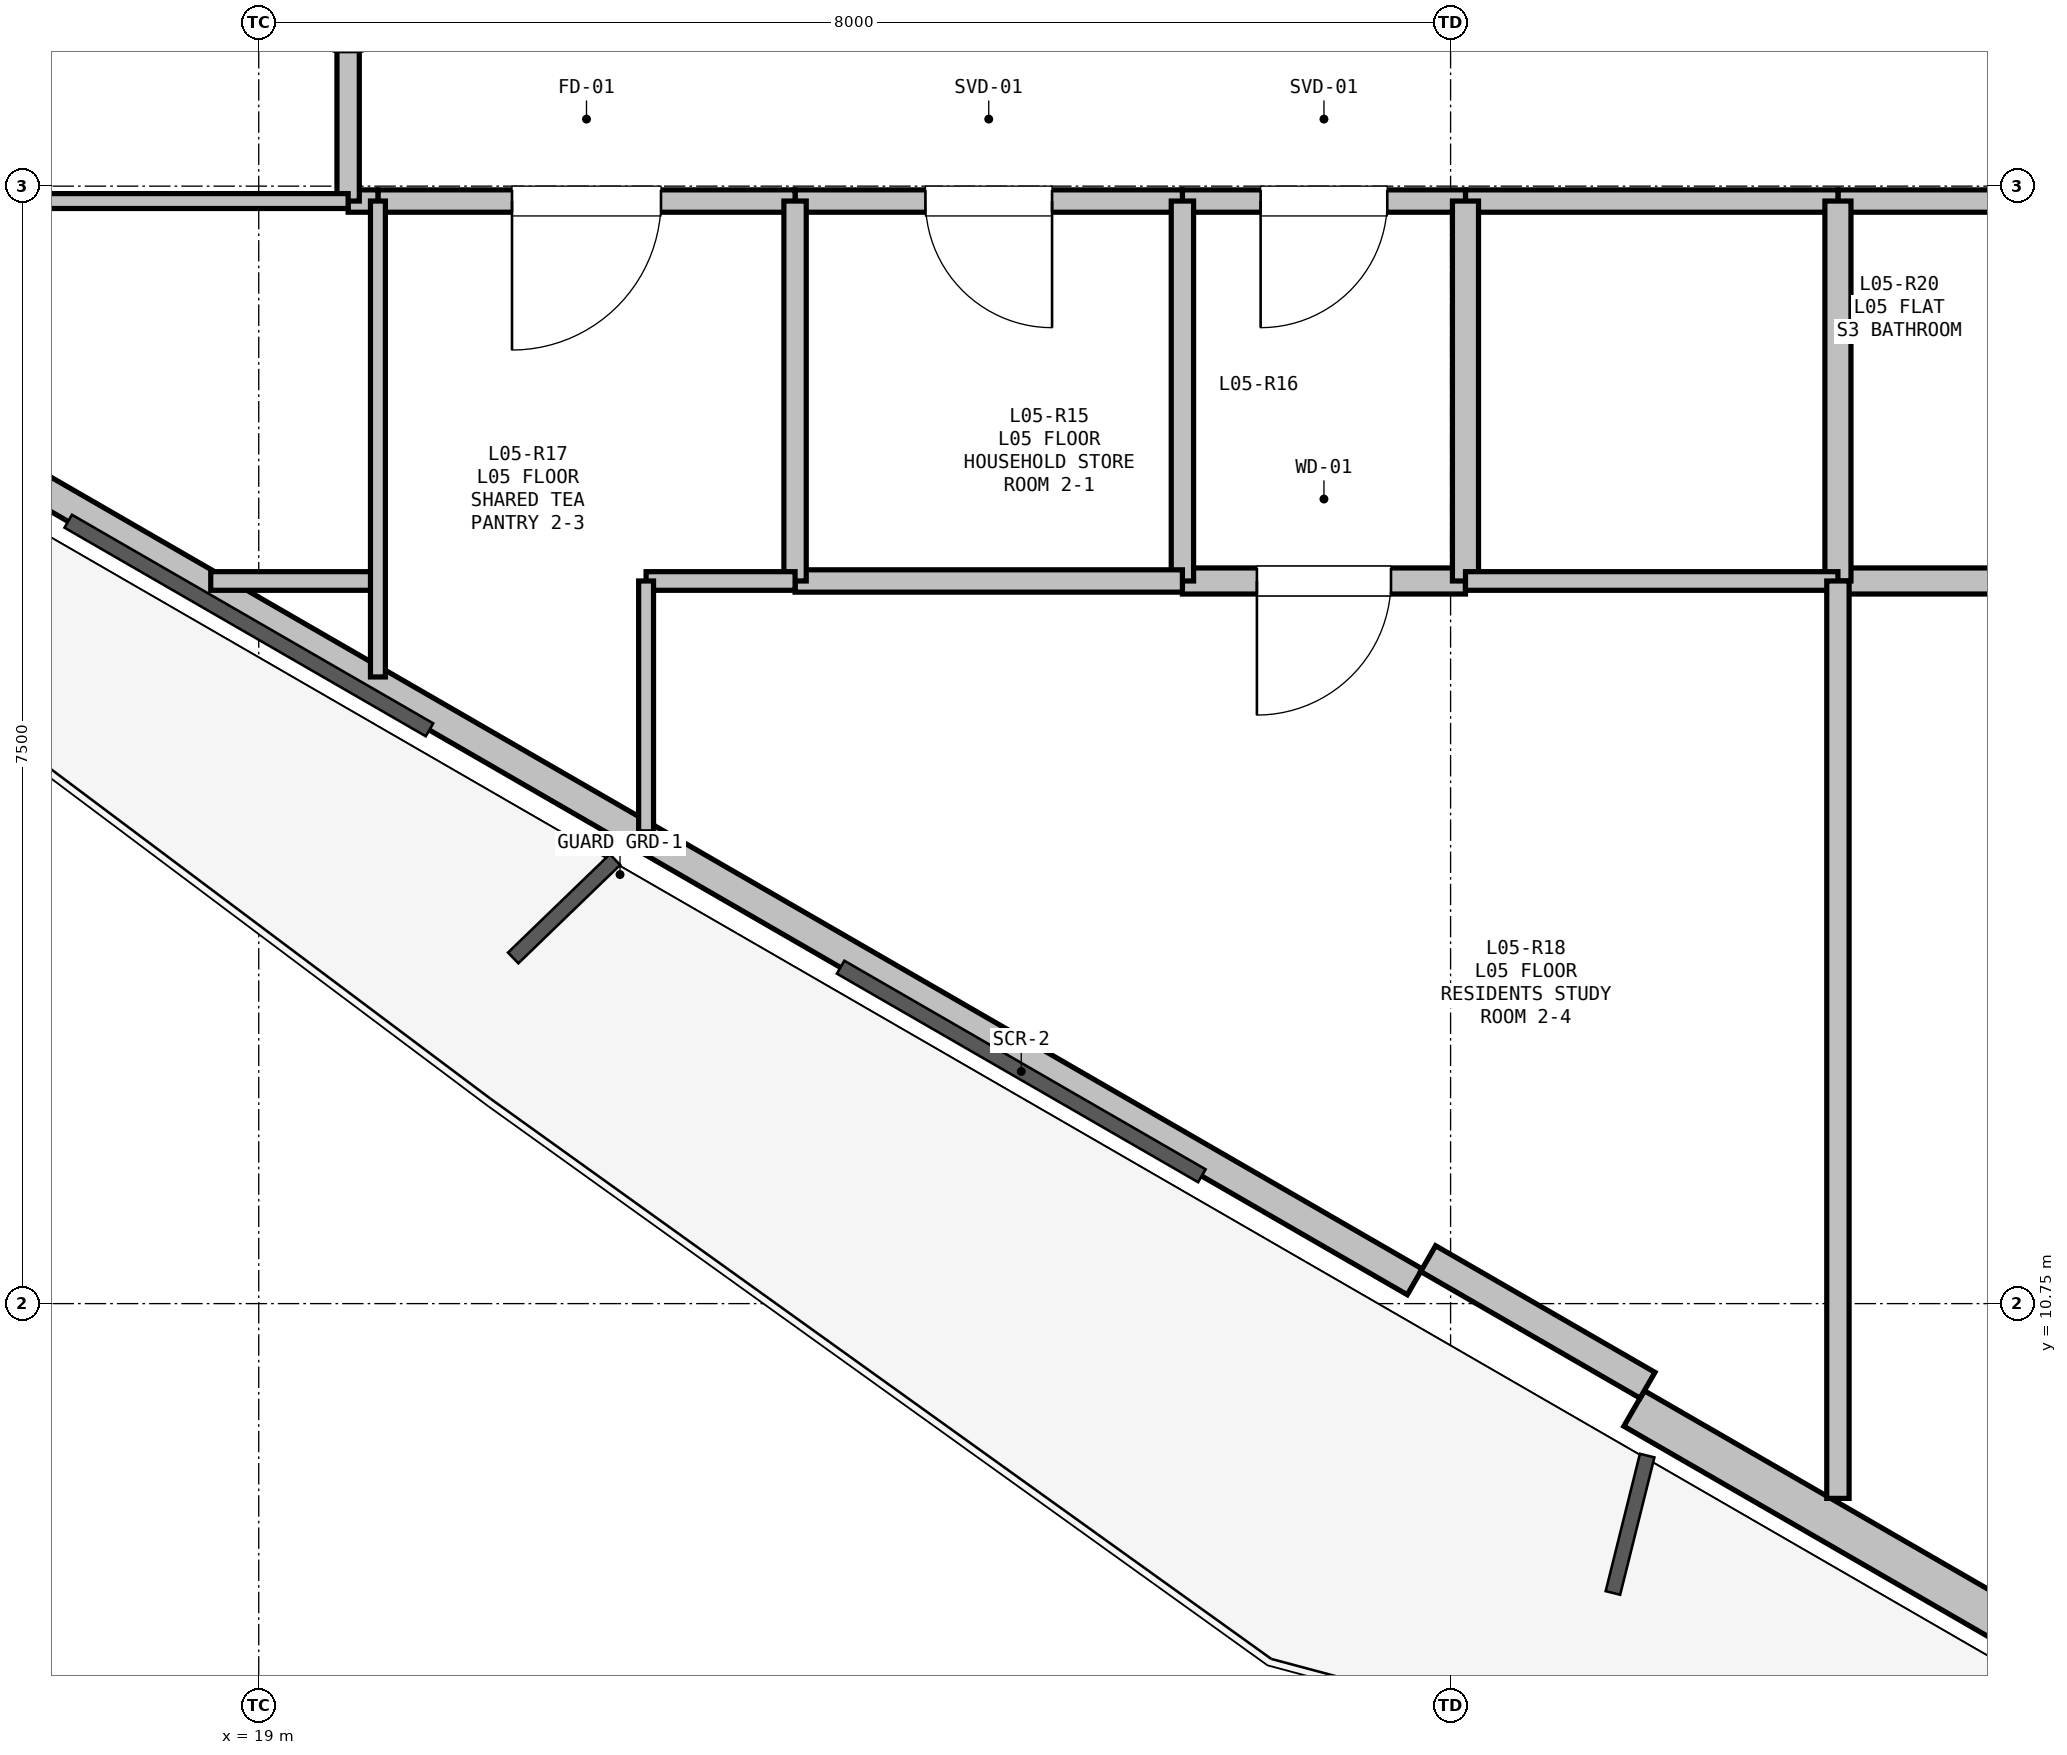
"""IFC4 building model, lengths in metres.
Left out: names, types, materials, properties, quantities, classifications, styles, units other than length and angle.
Written with IfcOpenShell. Run it as: python <this file> out.ifc"""

import sys

from ifc_helpers import new_model, si_unit, direction, frame, frame_2d, origin, place, context, subcontext, project, spatial, rectangle, extrude, element, fill, save


model = new_model("IFC4")
c1 = context("Model", 3, precision=1e-05, world=origin(), true_north=direction((0.0, 1.0)))
c2 = subcontext(c1, "Body", "Model", "MODEL_VIEW")
j1 = project(units=[si_unit("LENGTHUNIT", "METRE"), si_unit("PLANEANGLEUNIT", "RADIAN")], contexts=[c1])
p1 = place(None, origin())
s1 = spatial("IfcSite", under=j1, at=p1, CompositionType="ELEMENT")
p2 = place(p1, origin())
s2 = spatial("IfcBuilding", under=s1, at=p2, CompositionType="ELEMENT")
p3 = place(p2, frame((0.0, 0.0, 22.5)))
s3 = spatial("IfcBuildingStorey", under=s2, at=p3, CompositionType="ELEMENT", Elevation=22.5)
p4 = place(p3, frame((39.207, 3.71, 0.0), z_axis=(0.0, 0.0, 1.0), x_axis=(-0.86603192154, 0.499988710747, 0.0)))
e1 = element("IfcWall", 1, at=p4, inside=s3, PredefinedType="SOLIDWALL", context=c2, shape_type="SweptSolid", body=[
    extrude(rectangle(XDim=12.673, YDim=0.275, at=frame_2d((6.336, 0.0))), origin(), (0.0, 0.0, 1.0), 2.66),
])
p5 = place(p4, frame((8.136, 0.0, 0.0)))
e2 = element("IfcOpeningElement", 2, at=p5, cuts=e1, PredefinedType="OPENING", context=c2, shape_type="SweptSolid", body=[
    extrude(rectangle(XDim=1.0, YDim=2.1, at=frame_2d((0.5, 1.05))), frame((0.0, 0.147, 0.0), z_axis=(0.0, -1.0, 0.0), x_axis=(1.0, 0.0, 0.0)), (0.0, 0.0, 1.0), 0.295),
])
p6 = place(p4, frame((2.216, 0.0, 0.9)))
e3 = element("IfcOpeningElement", 3, at=p6, cuts=e1, PredefinedType="OPENING", context=c2, shape_type="SweptSolid", body=[
    extrude(rectangle(XDim=1.2, YDim=1.4, at=frame_2d((0.6, 0.7))), frame((0.0, 0.147, 0.0), z_axis=(0.0, -1.0, 0.0), x_axis=(1.0, 0.0, 0.0)), (0.0, 0.0, 1.0), 0.295),
])
p7 = place(p3, frame((26.76, 10.896, 0.0), z_axis=(0.0, 0.0, 1.0), x_axis=(-0.866027351828, 0.499996625875, 0.0)))
e4 = element("IfcWall", 4, at=p7, inside=s3, PredefinedType="PARAPET", context=c2, shape_type="SweptSolid", body=[
    extrude(rectangle(XDim=11.973, YDim=0.2, at=frame_2d((5.987, 0.0))), origin(), (0.0, 0.0, 1.0), 0.2),
])
p8 = place(p3, frame((28.322, 10.202, 0.0), z_axis=(0.0, 0.0, 1.0), x_axis=(-0.86605165483, 0.499954529098, 0.0)))
e5 = element("IfcWall", 5, at=p8, inside=s3, PredefinedType="PARAPET", context=c2, shape_type="SweptSolid", body=[
    extrude(rectangle(XDim=1.7, YDim=0.2, at=frame_2d((0.85, 0.0))), origin(), (0.0, 0.0, 1.0), 2.66),
])
p9 = place(p3, frame((31.6, 18.15, 0.0), z_axis=(0.0, 0.0, 1.0), x_axis=(-1.0, 0.0, 0.0)))
e6 = element("IfcWall", 6, at=p9, inside=s3, PredefinedType="PARTITIONING", context=c2, shape_type="SweptSolid", body=[
    extrude(rectangle(XDim=2.0, YDim=0.15, at=frame_2d((1.0, 0.0))), origin(), (0.0, 0.0, 1.0), 3.04),
])
p10 = place(p3, frame((29.6, 18.15, 0.0), z_axis=(0.0, 0.0, 1.0), x_axis=(-1.0, 0.0, 0.0)))
e7 = element("IfcWall", 7, at=p10, inside=s3, PredefinedType="PARTITIONING", context=c2, shape_type="SweptSolid", body=[
    extrude(rectangle(XDim=2.5, YDim=0.15, at=frame_2d((1.25, 0.0))), origin(), (0.0, 0.0, 1.0), 3.04),
])
p11 = place(p3, frame((27.1, 18.15, 0.0), z_axis=(0.0, 0.0, 1.0), x_axis=(-1.0, 0.0, 0.0)))
e8 = element("IfcWall", 8, at=p11, inside=s3, PredefinedType="PARTITIONING", context=c2, shape_type="SweptSolid", body=[
    extrude(rectangle(XDim=1.9, YDim=0.15, at=frame_2d((0.95, 0.0))), origin(), (0.0, 0.0, 1.0), 3.04),
])
p12 = place(p11, frame((0.525, 0.0, 0.0)))
e9 = element("IfcOpeningElement", 9, at=p12, cuts=e8, PredefinedType="OPENING", context=c2, shape_type="SweptSolid", body=[
    extrude(rectangle(XDim=0.85, YDim=2.1, at=frame_2d((0.425, 1.05))), frame((0.0, 0.085, 0.0), z_axis=(0.0, -1.0, 0.0), x_axis=(1.0, 0.0, 0.0)), (0.0, 0.0, 1.0), 0.17),
])
p13 = place(p3, frame((25.2, 18.15, 0.0), z_axis=(0.0, 0.0, 1.0), x_axis=(-1.0, 0.0, 0.0)))
e10 = element("IfcWall", 10, at=p13, inside=s3, PredefinedType="PARTITIONING", context=c2, shape_type="SweptSolid", body=[
    extrude(rectangle(XDim=2.6, YDim=0.15, at=frame_2d((1.3, 0.0))), origin(), (0.0, 0.0, 1.0), 2.337),
])
p14 = place(p13, frame((0.875, 0.0, 0.0)))
e11 = element("IfcOpeningElement", 11, at=p14, cuts=e10, PredefinedType="OPENING", context=c2, shape_type="SweptSolid", body=[
    extrude(rectangle(XDim=0.85, YDim=2.1, at=frame_2d((0.425, 1.05))), frame((0.0, 0.085, 0.0), z_axis=(0.0, -1.0, 0.0), x_axis=(1.0, 0.0, 0.0)), (0.0, 0.0, 1.0), 0.17),
])
p15 = place(p3, frame((22.6, 18.15, 0.0), z_axis=(0.0, 0.0, 1.0), x_axis=(-1.0, 0.0, 0.0)))
e12 = element("IfcWall", 12, at=p15, inside=s3, PredefinedType="PARTITIONING", context=c2, shape_type="SweptSolid", body=[
    extrude(rectangle(XDim=2.8, YDim=0.15, at=frame_2d((1.4, 0.0))), origin(), (0.0, 0.0, 1.0), 3.04),
])
p16 = place(p15, frame((0.9, 0.0, 0.0)))
e13 = element("IfcOpeningElement", 13, at=p16, cuts=e12, PredefinedType="OPENING", context=c2, shape_type="SweptSolid", body=[
    extrude(rectangle(XDim=1.0, YDim=2.15, at=frame_2d((0.5, 1.075))), frame((0.0, 0.085, 0.0), z_axis=(0.0, -1.0, 0.0), x_axis=(1.0, 0.0, 0.0)), (0.0, 0.0, 1.0), 0.17),
])
p17 = place(p3, frame((19.8, 18.15, 0.0), z_axis=(0.0, 0.0, 1.0), x_axis=(-1.0, 0.0, 0.0)))
e14 = element("IfcWall", 14, at=p17, inside=s3, PredefinedType="PARTITIONING", context=c2, shape_type="SweptSolid", body=[
    extrude(rectangle(XDim=0.2, YDim=0.15, at=frame_2d((0.1, 0.0))), origin(), (0.0, 0.0, 1.0), 3.04),
])
p18 = place(p3, frame((19.6, 18.15, 0.0), z_axis=(0.0, 0.0, 1.0), x_axis=(0.0, 1.0, 0.0)))
e15 = element("IfcWall", 15, at=p18, inside=s3, PredefinedType="PARTITIONING", context=c2, shape_type="SweptSolid", body=[
    extrude(rectangle(XDim=3.0, YDim=0.15, at=frame_2d((1.5, 0.0))), origin(), (0.0, 0.0, 1.0), 2.337),
])
p19 = place(p18, frame((1.0, 0.0, 0.0)))
e16 = element("IfcOpeningElement", 16, at=p19, cuts=e15, PredefinedType="OPENING", context=c2, shape_type="SweptSolid", body=[
    extrude(rectangle(XDim=1.0, YDim=2.15, at=frame_2d((0.5, 1.075))), frame((0.0, 0.085, 0.0), z_axis=(0.0, -1.0, 0.0), x_axis=(1.0, 0.0, 0.0)), (0.0, 0.0, 1.0), 0.17),
])
p20 = place(p3, frame((27.1, 15.6, 0.0), z_axis=(0.0, 0.0, 1.0), x_axis=(-1.0, 0.0, 0.0)))
e17 = element("IfcWall", 17, at=p20, inside=s3, PredefinedType="PLUMBINGWALL", context=c2, shape_type="SweptSolid", body=[
    extrude(rectangle(XDim=1.9, YDim=0.175, at=frame_2d((0.95, 0.0))), origin(), (0.0, 0.0, 1.0), 2.337),
])
p21 = place(p20, frame((0.5, 0.0, 0.0)))
e18 = element("IfcOpeningElement", 18, at=p21, cuts=e17, PredefinedType="OPENING", context=c2, shape_type="SweptSolid", body=[
    extrude(rectangle(XDim=0.9, YDim=2.1, at=frame_2d((0.45, 1.05))), frame((0.0, 0.097, 0.0), z_axis=(0.0, -1.0, 0.0), x_axis=(1.0, 0.0, 0.0)), (0.0, 0.0, 1.0), 0.195),
])
p22 = place(p3, frame((25.2, 15.6, 0.0), z_axis=(0.0, 0.0, 1.0), x_axis=(0.0, 1.0, 0.0)))
e19 = element("IfcWall", 19, at=p22, inside=s3, PredefinedType="PARTITIONING", context=c2, shape_type="SweptSolid", body=[
    extrude(rectangle(XDim=2.55, YDim=0.15, at=frame_2d((1.275, 0.0))), origin(), (0.0, 0.0, 1.0), 2.337),
])
p23 = place(p3, frame((27.1, 18.15, 0.0), z_axis=(0.0, 0.0, 1.0), x_axis=(0.0, -1.0, 0.0)))
e20 = element("IfcWall", 20, at=p23, inside=s3, PredefinedType="PLUMBINGWALL", context=c2, shape_type="SweptSolid", body=[
    extrude(rectangle(XDim=2.55, YDim=0.175, at=frame_2d((1.275, 0.0))), origin(), (0.0, 0.0, 1.0), 3.04),
])
p24 = place(p3, frame((31.6, 15.6, 0.0), z_axis=(0.0, 0.0, 1.0), x_axis=(-1.0, 0.0, 0.0)))
e21 = element("IfcWall", 21, at=p24, inside=s3, PredefinedType="PLUMBINGWALL", context=c2, shape_type="SweptSolid", body=[
    extrude(rectangle(XDim=2.0, YDim=0.175, at=frame_2d((1.0, 0.0))), origin(), (0.0, 0.0, 1.0), 3.04),
])
p25 = place(p3, frame((29.6, 15.6, 0.0), z_axis=(0.0, 0.0, 1.0), x_axis=(0.0, 1.0, 0.0)))
e22 = element("IfcWall", 22, at=p25, inside=s3, PredefinedType="PLUMBINGWALL", context=c2, shape_type="SweptSolid", body=[
    extrude(rectangle(XDim=2.55, YDim=0.175, at=frame_2d((1.275, 0.0))), origin(), (0.0, 0.0, 1.0), 3.04),
])
p26 = place(p3, frame((19.6, 18.15, 0.0), z_axis=(0.0, 0.0, 1.0), x_axis=(-1.0, 0.0, 0.0)))
e23 = element("IfcWall", 23, at=p26, inside=s3, PredefinedType="PARTITIONING", context=c2, shape_type="SweptSolid", body=[
    extrude(rectangle(XDim=2.45, YDim=0.1, at=frame_2d((1.225, 0.0))), origin(), (0.0, 0.0, 1.0), 3.04),
])
p27 = place(p3, frame((25.2, 15.6, 0.0), z_axis=(0.0, 0.0, 1.0), x_axis=(-1.0, 0.0, 0.0)))
e24 = element("IfcWall", 24, at=p27, inside=s3, PredefinedType="PARTITIONING", context=c2, shape_type="SweptSolid", body=[
    extrude(rectangle(XDim=2.6, YDim=0.15, at=frame_2d((1.3, 0.0))), origin(), (0.0, 0.0, 1.0), 3.04),
])
p28 = place(p3, frame((22.6, 15.6, 0.0), z_axis=(0.0, 0.0, 1.0), x_axis=(0.0, 1.0, 0.0)))
e25 = element("IfcWall", 25, at=p28, inside=s3, PredefinedType="PARTITIONING", context=c2, shape_type="SweptSolid", body=[
    extrude(rectangle(XDim=2.55, YDim=0.15, at=frame_2d((1.275, 0.0))), origin(), (0.0, 0.0, 1.0), 3.04),
])
p29 = place(p3, frame((22.6, 15.6, 0.0), z_axis=(0.0, 0.0, 1.0), x_axis=(-1.0, 0.0, 0.0)))
e26 = element("IfcWall", 26, at=p29, inside=s3, PredefinedType="PARTITIONING", context=c2, shape_type="SweptSolid", body=[
    extrude(rectangle(XDim=1.0, YDim=0.125, at=frame_2d((0.5, 0.0))), origin(), (0.0, 0.0, 1.0), 3.04),
])
p30 = place(p3, frame((21.6, 15.6, 0.0), z_axis=(0.0, 0.0, 1.0), x_axis=(0.0, -1.0, 0.0)))
e27 = element("IfcWall", 27, at=p30, inside=s3, PredefinedType="PARTITIONING", context=c2, shape_type="SweptSolid", body=[
    extrude(rectangle(XDim=1.684, YDim=0.1, at=frame_2d((0.842, 0.0))), origin(), (0.0, 0.0, 1.0), 2.365),
])
p31 = place(p3, frame((18.678, 15.6, 0.0), z_axis=(0.0, 0.0, 1.0), x_axis=(1.0, 0.0, 0.0)))
e28 = element("IfcWall", 28, at=p31, inside=s3, PredefinedType="PARTITIONING", context=c2, shape_type="SweptSolid", body=[
    extrude(rectangle(XDim=1.122, YDim=0.125, at=frame_2d((0.561, 0.0))), origin(), (0.0, 0.0, 1.0), 2.365),
])
p32 = place(p3, frame((19.8, 14.956, 0.0), z_axis=(0.0, 0.0, 1.0), x_axis=(0.0, 1.0, 0.0)))
e29 = element("IfcWall", 29, at=p32, inside=s3, PredefinedType="PARTITIONING", context=c2, shape_type="SweptSolid", body=[
    extrude(rectangle(XDim=3.194, YDim=0.1, at=frame_2d((1.597, 0.0))), origin(), (0.0, 0.0, 1.0), 2.365),
])
p33 = place(p3, frame((27.1, 15.6, 0.0), z_axis=(0.0, 0.0, 1.0), x_axis=(1.0, 0.0, 0.0)))
e30 = element("IfcWall", 30, at=p33, inside=s3, PredefinedType="PARTITIONING", context=c2, shape_type="SweptSolid", body=[
    extrude(rectangle(XDim=2.5, YDim=0.125, at=frame_2d((1.25, 0.0))), origin(), (0.0, 0.0, 1.0), 3.04),
])
p34 = place(p3, frame((29.6, 15.6, 0.0), z_axis=(0.0, 0.0, 1.0), x_axis=(0.0, -1.0, 0.0)))
e31 = element("IfcWall", 31, at=p34, inside=s3, PredefinedType="PARTITIONING", context=c2, shape_type="SweptSolid", body=[
    extrude(rectangle(XDim=6.157, YDim=0.15, at=frame_2d((3.079, 0.0))), origin(), (0.0, 0.0, 1.0), 2.337),
])
p35 = place(p12, origin())
e32 = element("IfcDoor", 32, at=p35, inside=s3, OperationType="SINGLE_SWING_RIGHT", PredefinedType="DOOR", context=c2, shape_type="SweptSolid", body=[
    extrude(rectangle(XDim=0.85, YDim=2.1, at=frame_2d((0.425, 1.05))), frame((0.0, 0.025, 0.0), z_axis=(0.0, -1.0, 0.0), x_axis=(1.0, 0.0, 0.0)), (0.0, 0.0, 1.0), 0.05),
])
fill(e9, e32)
p36 = place(p14, origin())
e33 = element("IfcDoor", 33, at=p36, inside=s3, OperationType="SINGLE_SWING_LEFT", PredefinedType="DOOR", context=c2, shape_type="SweptSolid", body=[
    extrude(rectangle(XDim=0.85, YDim=2.1, at=frame_2d((0.425, 1.05))), frame((0.0, 0.025, 0.0), z_axis=(0.0, -1.0, 0.0), x_axis=(1.0, 0.0, 0.0)), (0.0, 0.0, 1.0), 0.05),
])
fill(e11, e33)
p37 = place(p16, origin())
e34 = element("IfcDoor", 34, at=p37, inside=s3, OperationType="SINGLE_SWING_RIGHT", PredefinedType="DOOR", context=c2, shape_type="SweptSolid", body=[
    extrude(rectangle(XDim=1.0, YDim=2.15, at=frame_2d((0.5, 1.075))), frame((0.0, 0.025, 0.0), z_axis=(0.0, -1.0, 0.0), x_axis=(1.0, 0.0, 0.0)), (0.0, 0.0, 1.0), 0.05),
])
fill(e13, e34)
p38 = place(p21, origin())
e35 = element("IfcDoor", 35, at=p38, inside=s3, OperationType="SINGLE_SWING_RIGHT", PredefinedType="DOOR", context=c2, shape_type="SweptSolid", body=[
    extrude(rectangle(XDim=0.9, YDim=2.1, at=frame_2d((0.45, 1.05))), frame((0.0, 0.025, 0.0), z_axis=(0.0, -1.0, 0.0), x_axis=(1.0, 0.0, 0.0)), (0.0, 0.0, 1.0), 0.05),
])
fill(e18, e35)
save(model, sys.argv[1])
